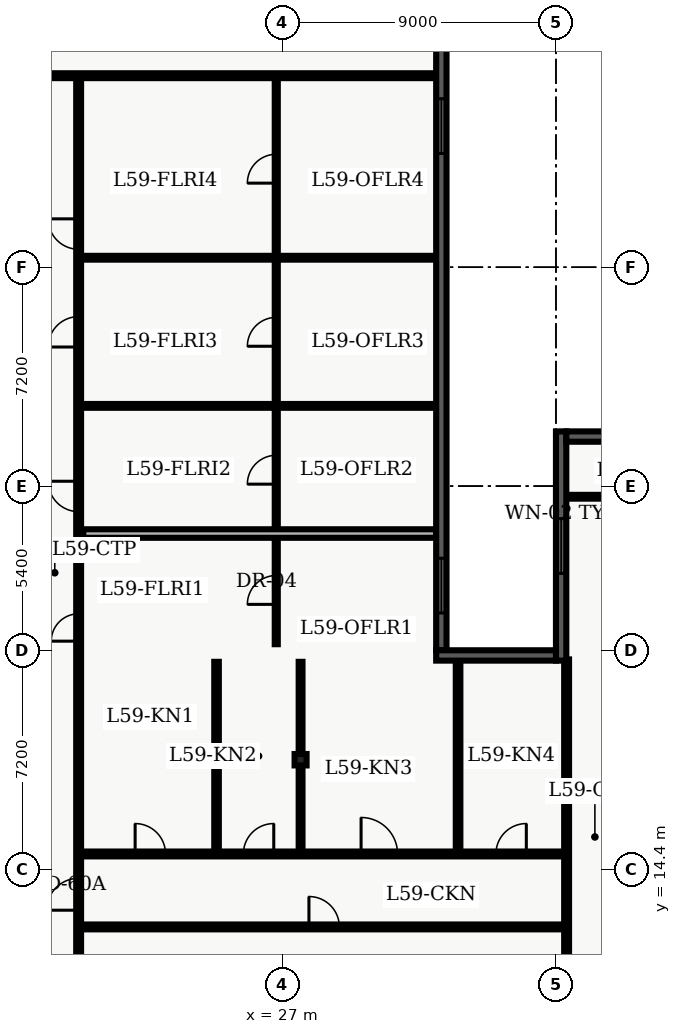
"""IFC4 building model, lengths in metres.
Left out: names, types, materials, properties, quantities, classifications, styles, units other than length and angle.
Written with IfcOpenShell. Run it as: python <this file> out.ifc"""

import sys

from ifc_helpers import new_model, entity, si_unit, converted_unit, direction, frame, origin_with_axes, origin_2d_with_axis, place, context, subcontext, project, spatial, polyline, rectangle, i_section, outline, extrude, element, fill, save


model = new_model("IFC4")
c1 = context("Model", 3, precision=1e-05, world=origin_with_axes(), true_north=direction((0.0, 1.0)))
c2 = subcontext(c1, "Body", "Model", "MODEL_VIEW")
j1 = project(units=[si_unit("LENGTHUNIT", "METRE"), converted_unit("PLANEANGLEUNIT", "DEGREE", entity("IfcPlaneAngleMeasure", 0.017), si_unit("PLANEANGLEUNIT", "RADIAN"), dimensions=[0, 0, 0, 0, 0, 0, 0])], contexts=[c1])
p1 = place(None, origin_with_axes())
s1 = spatial("IfcSite", under=j1, at=p1, CompositionType="ELEMENT")
p2 = place(p1, origin_with_axes())
s2 = spatial("IfcBuilding", under=s1, at=p2, CompositionType="ELEMENT")
p3 = place(p2, frame((0.0, 0.0, 240.3), z_axis=(0.0, 0.0, 1.0), x_axis=(1.0, 0.0, 0.0)))
s3 = spatial("IfcBuildingStorey", under=s2, at=p3, CompositionType="ELEMENT", Elevation=240.3)
p4 = place(p3, frame((27.6, 18.0, 0.0), z_axis=(0.0, 0.0, 1.0), x_axis=(1.0, 0.0, 0.0)))
e1 = element("IfcColumn", 1, at=p4, inside=s3, PredefinedType="COLUMN", context=c2, shape_type="SweptSolid", body=[
    extrude(i_section(OverallWidth=0.394, OverallDepth=0.375, WebThickness=0.017, FlangeThickness=0.028, FilletRadius=0.02, at=origin_2d_with_axis()), origin_with_axes(), (0.0, 0.0, 1.0), 3.9),
])
p5 = place(p3, frame((7.1, 40.5, 0.0), z_axis=(0.0, 0.0, 1.0), x_axis=(1.0, 0.0, 0.0)))
e2 = element("IfcWall", 2, at=p5, inside=s3, PredefinedType="PARTITIONING", context=c2, shape_type="SweptSolid", body=[
    extrude(outline(polyline([(0.0, -0.08), (24.965, -0.08), (24.965, 0.08), (0.0, 0.08), (0.0, -0.08)])), origin_with_axes(), (0.0, 0.0, 1.0), 2.7),
])
p6 = place(p5, frame((3.395, 0.0, 0.0), z_axis=(0.0, 0.0, 1.0), x_axis=(1.0, 0.0, 0.0)))
e3 = element("IfcOpeningElement", 3, at=p6, cuts=e2, PredefinedType="OPENING", context=c2, shape_type="SweptSolid", body=[
    extrude(rectangle(XDim=1.0, YDim=0.18, at=origin_2d_with_axis()), origin_with_axes(), (0.0, 0.0, 1.0), 2.15),
])
p7 = place(p5, frame((5.418, 0.0, 0.0), z_axis=(0.0, 0.0, 1.0), x_axis=(1.0, 0.0, 0.0)))
e4 = element("IfcOpeningElement", 4, at=p7, cuts=e2, PredefinedType="OPENING", context=c2, shape_type="SweptSolid", body=[
    extrude(rectangle(XDim=1.0, YDim=0.18, at=origin_2d_with_axis()), origin_with_axes(), (0.0, 0.0, 1.0), 2.15),
])
p8 = place(p5, frame((8.386, 0.0, 0.0), z_axis=(0.0, 0.0, 1.0), x_axis=(1.0, 0.0, 0.0)))
e5 = element("IfcOpeningElement", 5, at=p8, cuts=e2, PredefinedType="OPENING", context=c2, shape_type="SweptSolid", body=[
    extrude(rectangle(XDim=1.0, YDim=0.18, at=origin_2d_with_axis()), origin_with_axes(), (0.0, 0.0, 1.0), 2.15),
])
p9 = place(p5, frame((11.068, 0.0, 0.0), z_axis=(0.0, 0.0, 1.0), x_axis=(1.0, 0.0, 0.0)))
e6 = element("IfcOpeningElement", 6, at=p9, cuts=e2, PredefinedType="OPENING", context=c2, shape_type="SweptSolid", body=[
    extrude(rectangle(XDim=1.0, YDim=0.18, at=origin_2d_with_axis()), origin_with_axes(), (0.0, 0.0, 1.0), 2.15),
])
p10 = place(p3, frame((20.3, 7.8, 0.0), z_axis=(0.0, 0.0, 1.0), x_axis=(0.0, 1.0, 0.0)))
e7 = element("IfcWall", 7, at=p10, inside=s3, PredefinedType="PARTITIONING", context=c2, shape_type="SweptSolid", body=[
    extrude(outline(polyline([(0.0, -0.08), (32.7, -0.08), (32.7, 0.08), (0.0, 0.08), (0.0, -0.08)])), origin_with_axes(), (0.0, 0.0, 1.0), 2.7),
])
p11 = place(p10, frame((14.55, 0.0, 0.0), z_axis=(0.0, 0.0, 1.0), x_axis=(1.0, 0.0, 0.0)))
e8 = element("IfcOpeningElement", 8, at=p11, cuts=e7, PredefinedType="OPENING", context=c2, shape_type="SweptSolid", body=[
    extrude(rectangle(XDim=0.9, YDim=0.18, at=origin_2d_with_axis()), origin_with_axes(), (0.0, 0.0, 1.0), 2.15),
])
p12 = place(p10, frame((18.86, 0.0, 0.0), z_axis=(0.0, 0.0, 1.0), x_axis=(1.0, 0.0, 0.0)))
e9 = element("IfcOpeningElement", 9, at=p12, cuts=e7, PredefinedType="OPENING", context=c2, shape_type="SweptSolid", body=[
    extrude(rectangle(XDim=1.0, YDim=0.18, at=origin_2d_with_axis()), origin_with_axes(), (0.0, 0.0, 1.0), 2.15),
])
p13 = place(p10, frame((24.276, 0.0, 0.0), z_axis=(0.0, 0.0, 1.0), x_axis=(1.0, 0.0, 0.0)))
e10 = element("IfcOpeningElement", 10, at=p13, cuts=e7, PredefinedType="OPENING", context=c2, shape_type="SweptSolid", body=[
    extrude(rectangle(XDim=1.0, YDim=0.18, at=origin_2d_with_axis()), origin_with_axes(), (0.0, 0.0, 1.0), 2.15),
])
p14 = place(p10, frame((27.491, 0.0, 0.0), z_axis=(0.0, 0.0, 1.0), x_axis=(1.0, 0.0, 0.0)))
e11 = element("IfcOpeningElement", 11, at=p14, cuts=e7, PredefinedType="OPENING", context=c2, shape_type="SweptSolid", body=[
    extrude(rectangle(XDim=1.0, YDim=0.18, at=origin_2d_with_axis()), origin_with_axes(), (0.0, 0.0, 1.0), 2.15),
])
p15 = place(p10, frame((5.775, 0.0, 0.0), z_axis=(0.0, 0.0, 1.0), x_axis=(1.0, 0.0, 0.0)))
e12 = element("IfcOpeningElement", 12, at=p15, cuts=e7, PredefinedType="OPENING", context=c2, shape_type="SweptSolid", body=[
    extrude(rectangle(XDim=1.05, YDim=0.18, at=origin_2d_with_axis()), origin_with_axes(), (0.0, 0.0, 1.0), 2.15),
])
p16 = place(p3, frame((26.8, 21.8, 0.0), z_axis=(0.0, 0.0, 1.0), x_axis=(0.0, 1.0, 0.0)))
e13 = element("IfcWall", 13, at=p16, inside=s3, PredefinedType="PARTITIONING", context=c2, shape_type="SweptSolid", body=[
    extrude(outline(polyline([(0.0, -0.05), (18.5, -0.05), (18.5, 0.05), (0.0, 0.05), (0.0, -0.05)])), origin_with_axes(), (0.0, 0.0, 1.0), 2.7),
])
p17 = place(p16, frame((1.785, 0.0, 0.0), z_axis=(0.0, 0.0, 1.0), x_axis=(1.0, 0.0, 0.0)))
e14 = element("IfcOpeningElement", 14, at=p17, cuts=e13, PredefinedType="OPENING", context=c2, shape_type="SweptSolid", body=[
    extrude(rectangle(XDim=0.95, YDim=0.12, at=origin_2d_with_axis()), origin_with_axes(), (0.0, 0.0, 1.0), 2.15),
])
p18 = place(p16, frame((5.739, 0.0, 0.0), z_axis=(0.0, 0.0, 1.0), x_axis=(1.0, 0.0, 0.0)))
e15 = element("IfcOpeningElement", 15, at=p18, cuts=e13, PredefinedType="OPENING", context=c2, shape_type="SweptSolid", body=[
    extrude(rectangle(XDim=0.95, YDim=0.12, at=origin_2d_with_axis()), origin_with_axes(), (0.0, 0.0, 1.0), 2.15),
])
p19 = place(p16, frame((10.275, 0.0, 0.0), z_axis=(0.0, 0.0, 1.0), x_axis=(1.0, 0.0, 0.0)))
e16 = element("IfcOpeningElement", 16, at=p19, cuts=e13, PredefinedType="OPENING", context=c2, shape_type="SweptSolid", body=[
    extrude(rectangle(XDim=0.95, YDim=0.12, at=origin_2d_with_axis()), origin_with_axes(), (0.0, 0.0, 1.0), 2.15),
])
p20 = place(p16, frame((15.641, 0.0, 0.0), z_axis=(0.0, 0.0, 1.0), x_axis=(1.0, 0.0, 0.0)))
e17 = element("IfcOpeningElement", 17, at=p20, cuts=e13, PredefinedType="OPENING", context=c2, shape_type="SweptSolid", body=[
    extrude(rectangle(XDim=0.95, YDim=0.12, at=origin_2d_with_axis()), origin_with_axes(), (0.0, 0.0, 1.0), 2.15),
])
p21 = place(p3, frame((20.45, 25.44, 0.0), z_axis=(0.0, 0.0, 1.0), x_axis=(1.0, 0.0, 0.0)))
e18 = element("IfcWall", 18, at=p21, inside=s3, PredefinedType="PARTITIONING", context=c2, shape_type="SweptSolid", body=[
    extrude(outline(polyline([(0.0, -0.14), (11.615, -0.14), (11.615, 0.14), (0.0, 0.14), (0.0, -0.14)])), origin_with_axes(), (0.0, 0.0, 1.0), 2.7),
])
for number, where, z_axis, x_axis in (
    (19, (20.45, 29.639, 0.0), (0.0, 0.0, 1.0), (1.0, 0.0, 0.0)),
    (20, (20.45, 34.512, 0.0), (0.0, 0.0, 1.0), (1.0, 0.0, 0.0)),
):
    element("IfcWall", number, at=place(p3, frame(where, z_axis=z_axis, x_axis=x_axis)), inside=s3, PredefinedType="PARTITIONING", context=c2, shape_type="SweptSolid", body=[
        extrude(outline(polyline([(0.0, -0.062), (11.615, -0.062), (11.615, 0.062), (0.0, 0.062), (0.0, -0.062)])), origin_with_axes(), (0.0, 0.0, 1.0), 2.7),
    ])
p22 = place(p3, frame((20.3, 12.5, 0.0), z_axis=(0.0, 0.0, 1.0), x_axis=(1.0, 0.0, 0.0)))
e21 = element("IfcWall", 21, at=p22, inside=s3, PredefinedType="PARTITIONING", context=c2, shape_type="SweptSolid", body=[
    extrude(outline(polyline([(0.0, -0.08), (16.05, -0.08), (16.05, 0.08), (0.0, 0.08), (0.0, -0.08)])), origin_with_axes(), (0.0, 0.0, 1.0), 2.7),
])
p23 = place(p22, frame((8.075, 0.0, 0.0), z_axis=(0.0, 0.0, 1.0), x_axis=(1.0, 0.0, 0.0)))
e22 = element("IfcOpeningElement", 22, at=p23, cuts=e21, PredefinedType="OPENING", context=c2, shape_type="SweptSolid", body=[
    extrude(rectangle(XDim=1.0, YDim=0.18, at=origin_2d_with_axis()), origin_with_axes(), (0.0, 0.0, 1.0), 2.15),
])
p24 = place(p3, frame((20.3, 14.9, 0.0), z_axis=(0.0, 0.0, 1.0), x_axis=(1.0, 0.0, 0.0)))
e23 = element("IfcWall", 23, at=p24, inside=s3, PredefinedType="PARTITIONING", context=c2, shape_type="SweptSolid", body=[
    extrude(outline(polyline([(0.0, -0.08), (16.05, -0.08), (16.05, 0.08), (0.0, 0.08), (0.0, -0.08)])), origin_with_axes(), (0.0, 0.0, 1.0), 2.7),
])
p25 = place(p24, frame((2.358, 0.0, 0.0), z_axis=(0.0, 0.0, 1.0), x_axis=(1.0, 0.0, 0.0)))
e24 = element("IfcOpeningElement", 24, at=p25, cuts=e23, PredefinedType="OPENING", context=c2, shape_type="SweptSolid", body=[
    extrude(rectangle(XDim=1.0, YDim=0.18, at=origin_2d_with_axis()), origin_with_axes(), (0.0, 0.0, 1.0), 2.15),
])
p26 = place(p24, frame((5.918, 0.0, 0.0), z_axis=(0.0, 0.0, 1.0), x_axis=(1.0, 0.0, 0.0)))
e25 = element("IfcOpeningElement", 25, at=p26, cuts=e23, PredefinedType="OPENING", context=c2, shape_type="SweptSolid", body=[
    extrude(rectangle(XDim=1.0, YDim=0.18, at=origin_2d_with_axis()), origin_with_axes(), (0.0, 0.0, 1.0), 2.15),
])
p27 = place(p24, frame((9.89, 0.0, 0.0), z_axis=(0.0, 0.0, 1.0), x_axis=(1.0, 0.0, 0.0)))
e26 = element("IfcOpeningElement", 26, at=p27, cuts=e23, PredefinedType="OPENING", context=c2, shape_type="SweptSolid", body=[
    extrude(rectangle(XDim=1.2, YDim=0.18, at=origin_2d_with_axis()), origin_with_axes(), (0.0, 0.0, 1.0), 2.2),
])
p28 = place(p24, frame((14.225, 0.0, 0.0), z_axis=(0.0, 0.0, 1.0), x_axis=(1.0, 0.0, 0.0)))
e27 = element("IfcOpeningElement", 27, at=p28, cuts=e23, PredefinedType="OPENING", context=c2, shape_type="SweptSolid", body=[
    extrude(rectangle(XDim=1.0, YDim=0.18, at=origin_2d_with_axis()), origin_with_axes(), (0.0, 0.0, 1.0), 2.15),
])
p29 = place(p3, frame((36.35, 4.35, 0.0), z_axis=(0.0, 0.0, 1.0), x_axis=(0.0, 1.0, 0.0)))
e28 = element("IfcWall", 28, at=p29, inside=s3, PredefinedType="PARTITIONING", context=c2, shape_type="SweptSolid", body=[
    extrude(outline(polyline([(0.0, -0.08), (16.95, -0.08), (16.95, 0.08), (0.0, 0.08), (0.0, -0.08)])), origin_with_axes(), (0.0, 0.0, 1.0), 2.7),
])
p30 = place(p3, frame((24.836, 15.02, 0.0), z_axis=(0.0, 0.0, 1.0), x_axis=(0.0, 1.0, 0.0)))
e29 = element("IfcWall", 29, at=p30, inside=s3, PredefinedType="PARTITIONING", context=c2, shape_type="SweptSolid", body=[
    extrude(outline(polyline([(0.0, -0.075), (6.2, -0.075), (6.2, 0.075), (0.0, 0.075), (0.0, -0.075)])), origin_with_axes(), (0.0, 0.0, 1.0), 2.7),
])
p31 = place(p3, frame((27.6, 15.02, 0.0), z_axis=(0.0, 0.0, 1.0), x_axis=(0.0, 1.0, 0.0)))
e30 = element("IfcWall", 30, at=p31, inside=s3, PredefinedType="PARTITIONING", context=c2, shape_type="SweptSolid", body=[
    extrude(outline(polyline([(0.0, -0.062), (6.2, -0.062), (6.2, 0.062), (0.0, 0.062), (0.0, -0.062)])), origin_with_axes(), (0.0, 0.0, 1.0), 2.7),
])
p32 = place(p3, frame((32.78, 15.02, 0.0), z_axis=(0.0, 0.0, 1.0), x_axis=(0.0, 1.0, 0.0)))
e31 = element("IfcWall", 31, at=p32, inside=s3, PredefinedType="PARTITIONING", context=c2, shape_type="SweptSolid", body=[
    extrude(outline(polyline([(0.0, -0.075), (6.245, -0.075), (6.245, 0.075), (0.0, 0.075), (0.0, -0.075)])), origin_with_axes(), (0.0, 0.0, 1.0), 2.7),
])
p33 = place(p3, frame((36.335, 26.65, 0.0), z_axis=(0.0, 0.0, 1.0), x_axis=(1.0, 0.0, 0.0)))
e32 = element("IfcWall", 32, at=p33, inside=s3, PredefinedType="PARTITIONING", context=c2, shape_type="SweptSolid", body=[
    extrude(outline(polyline([(0.0, -0.062), (11.195, -0.062), (11.195, 0.062), (0.0, 0.062), (0.0, -0.062)])), origin_with_axes(), (0.0, 0.0, 1.0), 2.7),
])
p34 = place(p33, frame((6.665, 0.0, 0.0), z_axis=(0.0, 0.0, 1.0), x_axis=(1.0, 0.0, 0.0)))
e33 = element("IfcOpeningElement", 33, at=p34, cuts=e32, PredefinedType="OPENING", context=c2, shape_type="SweptSolid", body=[
    extrude(rectangle(XDim=1.0, YDim=0.145, at=origin_2d_with_axis()), origin_with_axes(), (0.0, 0.0, 1.0), 2.15),
])
p35 = place(p3, frame((36.17, 21.26, 0.0), z_axis=(0.0, 0.0, 1.0), x_axis=(0.0, 1.0, 0.0)))
e34 = element("IfcWall", 34, at=p35, inside=s3, PredefinedType="SOLIDWALL", context=c2, shape_type="SweptSolid", body=[
    extrude(outline(polyline([(0.0, -0.17), (7.54, -0.17), (7.54, 0.17), (0.0, 0.17), (0.0, -0.17)])), origin_with_axes(), (0.0, 0.0, 1.0), 3.66),
])
p36 = place(p35, frame((3.77, 0.0, 0.45), z_axis=(0.0, 0.0, 1.0), x_axis=(1.0, 0.0, 0.0)))
e35 = element("IfcOpeningElement", 35, at=p36, cuts=e34, PredefinedType="OPENING", context=c2, shape_type="SweptSolid", body=[
    extrude(rectangle(XDim=1.8, YDim=0.36, at=origin_2d_with_axis()), origin_with_axes(), (0.0, 0.0, 1.0), 2.1),
])
p37 = place(p3, frame((36.34, 28.63, 0.0), z_axis=(0.0, 0.0, 1.0), x_axis=(1.0, 0.0, 0.0)))
e36 = element("IfcWall", 36, at=p37, inside=s3, PredefinedType="SOLIDWALL", context=c2, shape_type="SweptSolid", body=[
    extrude(outline(polyline([(0.0, -0.17), (13.46, -0.17), (13.46, 0.17), (0.0, 0.17), (0.0, -0.17)])), origin_with_axes(), (0.0, 0.0, 1.0), 3.66),
])
p38 = place(p37, frame((3.665, 0.0, 0.45), z_axis=(0.0, 0.0, 1.0), x_axis=(1.0, 0.0, 0.0)))
e37 = element("IfcOpeningElement", 37, at=p38, cuts=e36, PredefinedType="OPENING", context=c2, shape_type="SweptSolid", body=[
    extrude(rectangle(XDim=1.8, YDim=0.36, at=origin_2d_with_axis()), origin_with_axes(), (0.0, 0.0, 1.0), 2.1),
])
p39 = place(p37, frame((9.795, 0.0, 0.45), z_axis=(0.0, 0.0, 1.0), x_axis=(1.0, 0.0, 0.0)))
e38 = element("IfcOpeningElement", 38, at=p39, cuts=e36, PredefinedType="OPENING", context=c2, shape_type="SweptSolid", body=[
    extrude(rectangle(XDim=1.8, YDim=0.36, at=origin_2d_with_axis()), origin_with_axes(), (0.0, 0.0, 1.0), 2.1),
])
p40 = place(p3, frame((32.23, 41.82, 0.0), z_axis=(0.0, 0.0, 1.0), x_axis=(0.0, -1.0, 0.0)))
e39 = element("IfcWall", 39, at=p40, inside=s3, PredefinedType="SOLIDWALL", context=c2, shape_type="SweptSolid", body=[
    extrude(outline(polyline([(0.0, -0.17), (20.22, -0.17), (20.22, 0.17), (0.0, 0.17), (0.0, -0.17)])), origin_with_axes(), (0.0, 0.0, 1.0), 3.66),
])
p41 = place(p40, frame((2.978, 0.0, 0.45), z_axis=(0.0, 0.0, 1.0), x_axis=(1.0, 0.0, 0.0)))
e40 = element("IfcOpeningElement", 40, at=p41, cuts=e39, PredefinedType="OPENING", context=c2, shape_type="SweptSolid", body=[
    extrude(rectangle(XDim=1.8, YDim=0.36, at=origin_2d_with_axis()), origin_with_axes(), (0.0, 0.0, 1.0), 2.1),
])
p42 = place(p40, frame((18.093, 0.0, 0.45), z_axis=(0.0, 0.0, 1.0), x_axis=(1.0, 0.0, 0.0)))
e41 = element("IfcOpeningElement", 41, at=p42, cuts=e39, PredefinedType="OPENING", context=c2, shape_type="SweptSolid", body=[
    extrude(rectangle(XDim=1.8, YDim=0.36, at=origin_2d_with_axis()), origin_with_axes(), (0.0, 0.0, 1.0), 2.1),
])
p43 = place(p3, frame((32.06, 21.43, 0.0), z_axis=(0.0, 0.0, 1.0), x_axis=(1.0, 0.0, 0.0)))
e42 = element("IfcWall", 42, at=p43, inside=s3, PredefinedType="SOLIDWALL", context=c2, shape_type="SweptSolid", body=[
    extrude(outline(polyline([(0.0, -0.17), (3.94, -0.17), (3.94, 0.17), (0.0, 0.17), (0.0, -0.17)])), origin_with_axes(), (0.0, 0.0, 1.0), 3.66),
])
p44 = place(p16, frame((1.785, 0.0, 0.0), z_axis=(0.0, 0.0, 1.0), x_axis=(1.0, 0.0, 0.0)))
e43 = element("IfcDoor", 43, at=p44, inside=s3, OperationType="SINGLE_SWING_LEFT", PredefinedType="DOOR", context=c2, shape_type="SweptSolid", body=[
    extrude(rectangle(XDim=0.95, YDim=0.06, at=origin_2d_with_axis()), origin_with_axes(), (0.0, 0.0, 1.0), 2.15),
])
fill(e14, e43)
p45 = place(p10, frame((14.55, 0.0, 0.0), z_axis=(0.0, 0.0, 1.0), x_axis=(1.0, 0.0, 0.0)))
e44 = element("IfcDoor", 44, at=p45, inside=s3, OperationType="SINGLE_SWING_LEFT", PredefinedType="DOOR", context=c2, shape_type="SweptSolid", body=[
    extrude(rectangle(XDim=0.9, YDim=0.09, at=origin_2d_with_axis()), origin_with_axes(), (0.0, 0.0, 1.0), 2.15),
])
fill(e8, e44)
p46 = place(p16, frame((5.739, 0.0, 0.0), z_axis=(0.0, 0.0, 1.0), x_axis=(1.0, 0.0, 0.0)))
e45 = element("IfcDoor", 45, at=p46, inside=s3, OperationType="SINGLE_SWING_LEFT", PredefinedType="DOOR", context=c2, shape_type="SweptSolid", body=[
    extrude(rectangle(XDim=0.95, YDim=0.06, at=origin_2d_with_axis()), origin_with_axes(), (0.0, 0.0, 1.0), 2.15),
])
fill(e15, e45)
p47 = place(p10, frame((18.86, 0.0, 0.0), z_axis=(0.0, 0.0, 1.0), x_axis=(1.0, 0.0, 0.0)))
e46 = element("IfcDoor", 46, at=p47, inside=s3, OperationType="SINGLE_SWING_RIGHT", PredefinedType="DOOR", context=c2, shape_type="SweptSolid", body=[
    extrude(rectangle(XDim=1.0, YDim=0.09, at=origin_2d_with_axis()), origin_with_axes(), (0.0, 0.0, 1.0), 2.15),
])
fill(e9, e46)
p48 = place(p16, frame((10.275, 0.0, 0.0), z_axis=(0.0, 0.0, 1.0), x_axis=(1.0, 0.0, 0.0)))
e47 = element("IfcDoor", 47, at=p48, inside=s3, OperationType="SINGLE_SWING_LEFT", PredefinedType="DOOR", context=c2, shape_type="SweptSolid", body=[
    extrude(rectangle(XDim=0.95, YDim=0.06, at=origin_2d_with_axis()), origin_with_axes(), (0.0, 0.0, 1.0), 2.15),
])
fill(e16, e47)
p49 = place(p10, frame((24.276, 0.0, 0.0), z_axis=(0.0, 0.0, 1.0), x_axis=(1.0, 0.0, 0.0)))
e48 = element("IfcDoor", 48, at=p49, inside=s3, OperationType="SINGLE_SWING_LEFT", PredefinedType="DOOR", context=c2, shape_type="SweptSolid", body=[
    extrude(rectangle(XDim=1.0, YDim=0.09, at=origin_2d_with_axis()), origin_with_axes(), (0.0, 0.0, 1.0), 2.15),
])
fill(e10, e48)
p50 = place(p16, frame((15.641, 0.0, 0.0), z_axis=(0.0, 0.0, 1.0), x_axis=(1.0, 0.0, 0.0)))
e49 = element("IfcDoor", 49, at=p50, inside=s3, OperationType="SINGLE_SWING_LEFT", PredefinedType="DOOR", context=c2, shape_type="SweptSolid", body=[
    extrude(rectangle(XDim=0.95, YDim=0.06, at=origin_2d_with_axis()), origin_with_axes(), (0.0, 0.0, 1.0), 2.15),
])
fill(e17, e49)
p51 = place(p10, frame((27.491, 0.0, 0.0), z_axis=(0.0, 0.0, 1.0), x_axis=(1.0, 0.0, 0.0)))
e50 = element("IfcDoor", 50, at=p51, inside=s3, OperationType="SINGLE_SWING_RIGHT", PredefinedType="DOOR", context=c2, shape_type="SweptSolid", body=[
    extrude(rectangle(XDim=1.0, YDim=0.09, at=origin_2d_with_axis()), origin_with_axes(), (0.0, 0.0, 1.0), 2.15),
])
fill(e11, e50)
p52 = place(p10, frame((5.775, 0.0, 0.0), z_axis=(0.0, 0.0, 1.0), x_axis=(1.0, 0.0, 0.0)))
e51 = element("IfcDoor", 51, at=p52, inside=s3, OperationType="SINGLE_SWING_LEFT", PredefinedType="DOOR", context=c2, shape_type="SweptSolid", body=[
    extrude(rectangle(XDim=1.05, YDim=0.09, at=origin_2d_with_axis()), origin_with_axes(), (0.0, 0.0, 1.0), 2.15),
])
fill(e12, e51)
p53 = place(p22, frame((8.075, 0.0, 0.0), z_axis=(0.0, 0.0, 1.0), x_axis=(1.0, 0.0, 0.0)))
e52 = element("IfcDoor", 52, at=p53, inside=s3, OperationType="SINGLE_SWING_LEFT", PredefinedType="DOOR", context=c2, shape_type="SweptSolid", body=[
    extrude(rectangle(XDim=1.0, YDim=0.09, at=origin_2d_with_axis()), origin_with_axes(), (0.0, 0.0, 1.0), 2.15),
])
fill(e22, e52)
p54 = place(p24, frame((2.358, 0.0, 0.0), z_axis=(0.0, 0.0, 1.0), x_axis=(1.0, 0.0, 0.0)))
e53 = element("IfcDoor", 53, at=p54, inside=s3, OperationType="SINGLE_SWING_LEFT", PredefinedType="DOOR", context=c2, shape_type="SweptSolid", body=[
    extrude(rectangle(XDim=1.0, YDim=0.09, at=origin_2d_with_axis()), origin_with_axes(), (0.0, 0.0, 1.0), 2.15),
])
fill(e24, e53)
p55 = place(p24, frame((5.918, 0.0, 0.0), z_axis=(0.0, 0.0, 1.0), x_axis=(1.0, 0.0, 0.0)))
e54 = element("IfcDoor", 54, at=p55, inside=s3, OperationType="SINGLE_SWING_RIGHT", PredefinedType="DOOR", context=c2, shape_type="SweptSolid", body=[
    extrude(rectangle(XDim=1.0, YDim=0.09, at=origin_2d_with_axis()), origin_with_axes(), (0.0, 0.0, 1.0), 2.15),
])
fill(e25, e54)
p56 = place(p24, frame((9.89, 0.0, 0.0), z_axis=(0.0, 0.0, 1.0), x_axis=(1.0, 0.0, 0.0)))
e55 = element("IfcDoor", 55, at=p56, inside=s3, OperationType="SINGLE_SWING_LEFT", PredefinedType="DOOR", context=c2, shape_type="SweptSolid", body=[
    extrude(rectangle(XDim=1.2, YDim=0.09, at=origin_2d_with_axis()), origin_with_axes(), (0.0, 0.0, 1.0), 2.2),
])
fill(e26, e55)
p57 = place(p24, frame((14.225, 0.0, 0.0), z_axis=(0.0, 0.0, 1.0), x_axis=(1.0, 0.0, 0.0)))
e56 = element("IfcDoor", 56, at=p57, inside=s3, OperationType="SINGLE_SWING_RIGHT", PredefinedType="DOOR", context=c2, shape_type="SweptSolid", body=[
    extrude(rectangle(XDim=1.0, YDim=0.09, at=origin_2d_with_axis()), origin_with_axes(), (0.0, 0.0, 1.0), 2.15),
])
fill(e27, e56)
p58 = place(p35, frame((3.77, 0.0, 0.45), z_axis=(0.0, 0.0, 1.0), x_axis=(1.0, 0.0, 0.0)))
e57 = element("IfcWindow", 57, at=p58, inside=s3, PredefinedType="WINDOW", context=c2, shape_type="SweptSolid", body=[
    extrude(rectangle(XDim=1.8, YDim=0.09, at=origin_2d_with_axis()), origin_with_axes(), (0.0, 0.0, 1.0), 2.1),
])
fill(e35, e57)
p59 = place(p40, frame((2.978, 0.0, 0.45), z_axis=(0.0, 0.0, 1.0), x_axis=(1.0, 0.0, 0.0)))
e58 = element("IfcWindow", 58, at=p59, inside=s3, PredefinedType="WINDOW", context=c2, shape_type="SweptSolid", body=[
    extrude(rectangle(XDim=1.8, YDim=0.09, at=origin_2d_with_axis()), origin_with_axes(), (0.0, 0.0, 1.0), 2.1),
])
fill(e40, e58)
p60 = place(p40, frame((18.093, 0.0, 0.45), z_axis=(0.0, 0.0, 1.0), x_axis=(1.0, 0.0, 0.0)))
e59 = element("IfcWindow", 59, at=p60, inside=s3, PredefinedType="WINDOW", context=c2, shape_type="SweptSolid", body=[
    extrude(rectangle(XDim=1.8, YDim=0.09, at=origin_2d_with_axis()), origin_with_axes(), (0.0, 0.0, 1.0), 2.1),
])
fill(e41, e59)
save(model, sys.argv[1])
